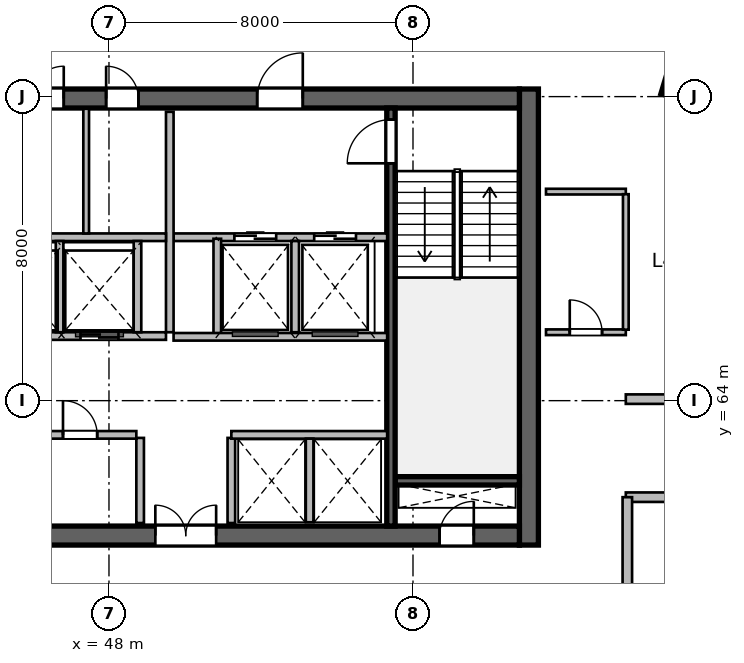
"""IFC4 building model, lengths in metres.
Left out: names, types, materials, properties, quantities, classifications, styles, units other than length and angle.
Written with IfcOpenShell. Run it as: python <this file> out.ifc"""

import sys

from ifc_helpers import new_model, si_unit, direction, frame, frame_2d, origin, origin_2d, place, context, subcontext, project, spatial, rectangle, extrude, source, transform, mapped, element, fill, save


model = new_model("IFC4")
c1 = context("Model", 3, precision=1e-05, world=origin(), true_north=direction((0.0, 1.0)))
c2 = subcontext(c1, "Body", "Model", "MODEL_VIEW")
j1 = project(units=[si_unit("LENGTHUNIT", "METRE"), si_unit("PLANEANGLEUNIT", "RADIAN")], contexts=[c1])
p1 = place(None, origin())
s1 = spatial("IfcSite", under=j1, at=p1, CompositionType="ELEMENT")
p2 = place(p1, origin())
s2 = spatial("IfcBuilding", under=s1, at=p2, CompositionType="ELEMENT")
p3 = place(p2, frame((0.0, 0.0, 177.9)))
s3 = spatial("IfcBuildingStorey", under=s2, at=p3, CompositionType="ELEMENT", Elevation=177.9)
m1 = source(origin(), c2, "Body", "SweptSolid", [
    extrude(rectangle(XDim=12.0, YDim=0.5, at=frame_2d((6.0, 0.0))), origin(), (0.0, 0.0, 1.0), 3.9),
])
p4 = place(p3, frame((59.05, 60.2, 0.0), z_axis=(0.0, 0.0, 1.0), x_axis=(0.0, 1.0, 0.0)))
e1 = element("IfcWall", 1, at=p4, inside=s3, PredefinedType="SHEAR", context=c2, shape_type="MappedRepresentation", body=[
    mapped(m1, transform((0.0, 0.0, 0.0), scale=1.0)),
])
m2 = source(origin(), c2, "Body", "SweptSolid", [
    extrude(rectangle(XDim=21.6, YDim=0.5, at=frame_2d((10.8, 0.0))), origin(), (0.0, 0.0, 1.0), 3.9),
])
p5 = place(p3, frame((37.2, 60.45, 0.0), z_axis=(0.0, 0.0, 1.0), x_axis=(1.0, 0.0, 0.0)))
e2 = element("IfcWall", 2, at=p5, inside=s3, PredefinedType="SHEAR", context=c2, shape_type="MappedRepresentation", body=[
    mapped(m2, transform((0.0, 0.0, 0.0), scale=1.0)),
])
p6 = place(p5, frame((1.1, 0.0, 0.0)))
e3 = element("IfcOpeningElement", 3, at=p6, cuts=e2, PredefinedType="OPENING", context=c2, shape_type="SweptSolid", body=[
    extrude(rectangle(XDim=1.15, YDim=2.15, at=frame_2d((0.575, 1.075))), frame((0.0, 0.26, 0.0), z_axis=(0.0, -1.0, 0.0), x_axis=(1.0, 0.0, 0.0)), (0.0, 0.0, 1.0), 0.52),
])
p7 = place(p5, frame((19.5, 0.0, 0.0)))
e4 = element("IfcOpeningElement", 4, at=p7, cuts=e2, PredefinedType="OPENING", context=c2, shape_type="SweptSolid", body=[
    extrude(rectangle(XDim=0.9, YDim=2.1, at=frame_2d((0.45, 1.05))), frame((0.0, 0.26, 0.0), z_axis=(0.0, -1.0, 0.0), x_axis=(1.0, 0.0, 0.0)), (0.0, 0.0, 1.0), 0.52),
])
p8 = place(p5, frame((12.02, 0.0, 0.0)))
e5 = element("IfcOpeningElement", 5, at=p8, cuts=e2, PredefinedType="OPENING", context=c2, shape_type="SweptSolid", body=[
    extrude(rectangle(XDim=1.6, YDim=2.15, at=frame_2d((0.8, 1.075))), frame((0.0, 0.26, 0.0), z_axis=(0.0, -1.0, 0.0), x_axis=(1.0, 0.0, 0.0)), (0.0, 0.0, 1.0), 0.52),
])
p9 = place(p3, frame((37.2, 71.95, 0.0), z_axis=(0.0, 0.0, 1.0), x_axis=(1.0, 0.0, 0.0)))
e6 = element("IfcWall", 6, at=p9, inside=s3, PredefinedType="SHEAR", context=c2, shape_type="MappedRepresentation", body=[
    mapped(m2, transform((0.0, 0.0, 0.0), scale=1.0)),
])
p10 = place(p9, frame((1.2, 0.0, 0.0)))
e7 = element("IfcOpeningElement", 7, at=p10, cuts=e6, PredefinedType="OPENING", context=c2, shape_type="SweptSolid", body=[
    extrude(rectangle(XDim=0.9, YDim=2.1, at=frame_2d((0.45, 1.05))), frame((0.0, 0.26, 0.0), z_axis=(0.0, -1.0, 0.0), x_axis=(1.0, 0.0, 0.0)), (0.0, 0.0, 1.0), 0.52),
])
p11 = place(p9, frame((14.7, 0.0, 0.0)))
e8 = element("IfcOpeningElement", 8, at=p11, cuts=e6, PredefinedType="OPENING", context=c2, shape_type="SweptSolid", body=[
    extrude(rectangle(XDim=1.2, YDim=2.15, at=frame_2d((0.6, 1.075))), frame((0.0, 0.26, 0.0), z_axis=(0.0, -1.0, 0.0), x_axis=(1.0, 0.0, 0.0)), (0.0, 0.0, 1.0), 0.52),
])
p12 = place(p9, frame((4.15, 0.0, 0.0)))
e9 = element("IfcOpeningElement", 9, at=p12, cuts=e6, PredefinedType="OPENING", context=c2, shape_type="SweptSolid", body=[
    extrude(rectangle(XDim=1.3, YDim=2.15, at=frame_2d((0.65, 1.075))), frame((0.0, 0.26, 0.0), z_axis=(0.0, -1.0, 0.0), x_axis=(1.0, 0.0, 0.0)), (0.0, 0.0, 1.0), 0.52),
])
p13 = place(p9, frame((6.76, 0.0, 0.0)))
e10 = element("IfcOpeningElement", 10, at=p13, cuts=e6, PredefinedType="OPENING", context=c2, shape_type="SweptSolid", body=[
    extrude(rectangle(XDim=0.85, YDim=2.1, at=frame_2d((0.425, 1.05))), frame((0.0, 0.26, 0.0), z_axis=(0.0, -1.0, 0.0), x_axis=(1.0, 0.0, 0.0)), (0.0, 0.0, 1.0), 0.52),
])
p14 = place(p9, frame((8.76, 0.0, 0.0)))
e11 = element("IfcOpeningElement", 11, at=p14, cuts=e6, PredefinedType="OPENING", context=c2, shape_type="SweptSolid", body=[
    extrude(rectangle(XDim=0.85, YDim=2.1, at=frame_2d((0.425, 1.05))), frame((0.0, 0.26, 0.0), z_axis=(0.0, -1.0, 0.0), x_axis=(1.0, 0.0, 0.0)), (0.0, 0.0, 1.0), 0.52),
])
p15 = place(p9, frame((10.725, 0.0, 0.0)))
e12 = element("IfcOpeningElement", 12, at=p15, cuts=e6, PredefinedType="OPENING", context=c2, shape_type="SweptSolid", body=[
    extrude(rectangle(XDim=0.85, YDim=2.1, at=frame_2d((0.425, 1.05))), frame((0.0, 0.26, 0.0), z_axis=(0.0, -1.0, 0.0), x_axis=(1.0, 0.0, 0.0)), (0.0, 0.0, 1.0), 0.52),
])
m3 = source(origin(), c2, "Body", "SweptSolid", [
    extrude(rectangle(XDim=3.27, YDim=0.22, at=frame_2d((1.635, 0.0))), origin(), (0.0, 0.0, 1.0), 3.9),
])
p16 = place(p3, frame((55.53, 61.89, 0.0), z_axis=(0.0, 0.0, 1.0), x_axis=(1.0, 0.0, 0.0)))
e13 = element("IfcWall", 13, at=p16, inside=s3, PredefinedType="SHEAR", context=c2, shape_type="MappedRepresentation", body=[
    mapped(m3, transform((0.0, 0.0, 0.0), scale=1.0)),
])
m4 = source(origin(), c2, "Body", "SweptSolid", [
    extrude(rectangle(XDim=11.0, YDim=0.22, at=frame_2d((5.5, 0.0))), origin(), (0.0, 0.0, 1.0), 3.9),
])
p17 = place(p3, frame((55.42, 60.7, 0.0), z_axis=(0.0, 0.0, 1.0), x_axis=(0.0, 1.0, 0.0)))
e14 = element("IfcWall", 14, at=p17, inside=s3, PredefinedType="SHEAR", context=c2, shape_type="MappedRepresentation", body=[
    mapped(m4, transform((0.0, 0.0, 0.0), scale=1.0)),
])
p18 = place(p17, frame((9.545, 0.0, 0.0)))
e15 = element("IfcOpeningElement", 15, at=p18, cuts=e14, PredefinedType="OPENING", context=c2, shape_type="SweptSolid", body=[
    extrude(rectangle(XDim=1.15, YDim=2.15, at=frame_2d((0.575, 1.075))), frame((0.0, 0.12, 0.0), z_axis=(0.0, -1.0, 0.0), x_axis=(1.0, 0.0, 0.0)), (0.0, 0.0, 1.0), 0.24),
])
m5 = source(origin(), c2, "Body", "SweptSolid", [
    extrude(rectangle(XDim=1.1, YDim=1.1, at=origin_2d()), origin(), (0.0, 0.0, 1.0), 3.9),
])
p19 = place(p3, frame((63.209, 72.442, 0.0), z_axis=(0.0, 0.0, 1.0), x_axis=(0.288697611798, 0.957420330337, 0.0)))
e16 = element("IfcColumn", 16, at=p19, inside=s3, PredefinedType="COLUMN", context=c2, shape_type="MappedRepresentation", body=[
    mapped(m5, transform((0.0, 0.0, 0.0), scale=1.0)),
])
m6 = source(origin(), c2, "Body", "SweptSolid", [
    extrude(rectangle(XDim=2.24, YDim=0.2, at=frame_2d((1.12, 0.0))), origin(), (0.0, 0.0, 1.0), 3.65),
])
for number, where, z_axis, x_axis in (
    (17, (48.82, 60.78, 0.0), (0.0, 0.0, 1.0), (0.0, 1.0, 0.0)),
    (18, (51.22, 60.78, 0.0), (0.0, 0.0, 1.0), (0.0, 1.0, 0.0)),
):
    element("IfcWall", number, at=place(p3, frame(where, z_axis=z_axis, x_axis=x_axis)), inside=s3, PredefinedType="SOLIDWALL", context=c2, shape_type="MappedRepresentation", body=[
        mapped(m6, transform((0.0, 0.0, 0.0), scale=1.0)),
    ])
m7 = source(origin(), c2, "Body", "SweptSolid", [
    extrude(rectangle(XDim=5.62, YDim=0.2, at=frame_2d((2.81, 0.0))), origin(), (0.0, 0.0, 1.0), 3.65),
])
p20 = place(p3, frame((49.7, 68.3, 0.0), z_axis=(0.0, 0.0, 1.0), x_axis=(1.0, 0.0, 0.0)))
e19 = element("IfcWall", 19, at=p20, inside=s3, PredefinedType="SOLIDWALL", context=c2, shape_type="MappedRepresentation", body=[
    mapped(m7, transform((0.0, 0.0, 0.0), scale=1.0)),
])
p21 = place(p20, frame((1.6, 0.0, 0.0)))
e20 = element("IfcOpeningElement", 20, at=p21, cuts=e19, PredefinedType="OPENING", context=c2, shape_type="SweptSolid", body=[
    extrude(rectangle(XDim=1.1, YDim=2.15, at=frame_2d((0.55, 1.075))), frame((0.0, 0.11, 0.0), z_axis=(0.0, -1.0, 0.0), x_axis=(1.0, 0.0, 0.0)), (0.0, 0.0, 1.0), 0.22),
])
p22 = place(p20, frame((3.7, 0.0, 0.0)))
e21 = element("IfcOpeningElement", 21, at=p22, cuts=e19, PredefinedType="OPENING", context=c2, shape_type="SweptSolid", body=[
    extrude(rectangle(XDim=1.1, YDim=2.15, at=frame_2d((0.55, 1.075))), frame((0.0, 0.11, 0.0), z_axis=(0.0, -1.0, 0.0), x_axis=(1.0, 0.0, 0.0)), (0.0, 0.0, 1.0), 0.22),
])
m8 = source(origin(), c2, "Body", "SweptSolid", [
    extrude(rectangle(XDim=5.8, YDim=0.2, at=frame_2d((2.9, 0.0))), origin(), (0.0, 0.0, 1.0), 3.65),
])
p23 = place(p3, frame((49.6, 65.8, 0.0), z_axis=(0.0, 0.0, 1.0), x_axis=(0.0, 1.0, 0.0)))
e22 = element("IfcWall", 22, at=p23, inside=s3, PredefinedType="SOLIDWALL", context=c2, shape_type="MappedRepresentation", body=[
    mapped(m8, transform((0.0, 0.0, 0.0), scale=1.0)),
])
m9 = source(origin(), c2, "Body", "SweptSolid", [
    extrude(rectangle(XDim=2.58, YDim=0.2, at=frame_2d((1.29, 0.0))), origin(), (0.0, 0.0, 1.0), 3.65),
])
p24 = place(p3, frame((50.85, 65.68, 0.0), z_axis=(0.0, 0.0, 1.0), x_axis=(0.0, 1.0, 0.0)))
e23 = element("IfcWall", 23, at=p24, inside=s3, PredefinedType="SOLIDWALL", context=c2, shape_type="MappedRepresentation", body=[
    mapped(m9, transform((0.0, 0.0, 0.0), scale=1.0)),
])
m10 = source(origin(), c2, "Body", "SweptSolid", [
    extrude(rectangle(XDim=2.4, YDim=0.2, at=frame_2d((1.2, 0.0))), origin(), (0.0, 0.0, 1.0), 3.65),
])
p25 = place(p3, frame((52.9, 65.8, 0.0), z_axis=(0.0, 0.0, 1.0), x_axis=(0.0, 1.0, 0.0)))
e24 = element("IfcWall", 24, at=p25, inside=s3, PredefinedType="SOLIDWALL", context=c2, shape_type="MappedRepresentation", body=[
    mapped(m10, transform((0.0, 0.0, 0.0), scale=1.0)),
])
p26 = place(p3, frame((49.7, 65.68, 0.0), z_axis=(0.0, 0.0, 1.0), x_axis=(1.0, 0.0, 0.0)))
e25 = element("IfcWall", 25, at=p26, inside=s3, PredefinedType="SOLIDWALL", context=c2, shape_type="MappedRepresentation", body=[
    mapped(m7, transform((0.0, 0.0, 0.0), scale=1.0)),
])
m11 = source(origin(), c2, "Body", "SweptSolid", [
    extrude(rectangle(XDim=8.8, YDim=0.2, at=frame_2d((4.4, 0.0))), origin(), (0.0, 0.0, 1.0), 3.65),
])
p27 = place(p3, frame((40.7, 68.3, 0.0), z_axis=(0.0, 0.0, 1.0), x_axis=(1.0, 0.0, 0.0)))
e26 = element("IfcWall", 26, at=p27, inside=s3, PredefinedType="SOLIDWALL", context=c2, shape_type="MappedRepresentation", body=[
    mapped(m11, transform((0.0, 0.0, 0.0), scale=1.0)),
])
m12 = source(origin(), c2, "Body", "SweptSolid", [
    extrude(rectangle(XDim=3.28, YDim=0.15, at=frame_2d((1.64, 0.0))), origin(), (0.0, 0.0, 1.0), 3.65),
])
p28 = place(p3, frame((47.4, 68.4, 0.0), z_axis=(0.0, 0.0, 1.0), x_axis=(0.0, 1.0, 0.0)))
e27 = element("IfcWall", 27, at=p28, inside=s3, PredefinedType="PARTITIONING", context=c2, shape_type="MappedRepresentation", body=[
    mapped(m12, transform((0.0, 0.0, 0.0), scale=1.0)),
])
m13 = source(origin(), c2, "Body", "SweptSolid", [
    extrude(rectangle(XDim=8.02, YDim=0.2, at=frame_2d((4.01, 0.0))), origin(), (0.0, 0.0, 1.0), 3.65),
])
p29 = place(p3, frame((40.7, 63.1, 0.0), z_axis=(0.0, 0.0, 1.0), x_axis=(1.0, 0.0, 0.0)))
e28 = element("IfcWall", 28, at=p29, inside=s3, PredefinedType="SOLIDWALL", context=c2, shape_type="MappedRepresentation", body=[
    mapped(m13, transform((0.0, 0.0, 0.0), scale=1.0)),
])
p30 = place(p29, frame((2.15, 0.0, 0.0)))
e29 = element("IfcOpeningElement", 29, at=p30, cuts=e28, PredefinedType="OPENING", context=c2, shape_type="SweptSolid", body=[
    extrude(rectangle(XDim=0.9, YDim=2.1, at=frame_2d((0.45, 1.05))), frame((0.0, 0.11, 0.0), z_axis=(0.0, -1.0, 0.0), x_axis=(1.0, 0.0, 0.0)), (0.0, 0.0, 1.0), 0.22),
])
p31 = place(p29, frame((6.09, 0.0, 0.0)))
e30 = element("IfcOpeningElement", 30, at=p31, cuts=e28, PredefinedType="OPENING", context=c2, shape_type="SweptSolid", body=[
    extrude(rectangle(XDim=0.9, YDim=2.1, at=frame_2d((0.45, 1.05))), frame((0.0, 0.11, 0.0), z_axis=(0.0, -1.0, 0.0), x_axis=(1.0, 0.0, 0.0)), (0.0, 0.0, 1.0), 0.22),
])
m14 = source(origin(), c2, "Body", "SweptSolid", [
    extrude(rectangle(XDim=4.1, YDim=0.2, at=frame_2d((2.05, 0.0))), origin(), (0.0, 0.0, 1.0), 3.65),
])
p32 = place(p3, frame((51.22, 63.1, 0.0), z_axis=(0.0, 0.0, 1.0), x_axis=(1.0, 0.0, 0.0)))
e31 = element("IfcWall", 31, at=p32, inside=s3, PredefinedType="SOLIDWALL", context=c2, shape_type="MappedRepresentation", body=[
    mapped(m14, transform((0.0, 0.0, 0.0), scale=1.0)),
])
m15 = source(origin(), c2, "Body", "SweptSolid", [
    extrude(rectangle(XDim=2.2, YDim=0.2, at=frame_2d((1.1, 0.0))), origin(), (0.0, 0.0, 1.0), 3.65),
])
p33 = place(p3, frame((53.28, 60.8, 0.0), z_axis=(0.0, 0.0, 1.0), x_axis=(0.0, 1.0, 0.0)))
e32 = element("IfcWall", 32, at=p33, inside=s3, PredefinedType="SOLIDWALL", context=c2, shape_type="MappedRepresentation", body=[
    mapped(m15, transform((0.0, 0.0, 0.0), scale=1.0)),
])
p34 = place(p3, frame((40.7, 65.7, 0.0), z_axis=(0.0, 0.0, 1.0), x_axis=(1.0, 0.0, 0.0)))
e33 = element("IfcWall", 33, at=p34, inside=s3, PredefinedType="SOLIDWALL", context=c2, shape_type="MappedRepresentation", body=[
    mapped(m11, transform((0.0, 0.0, 0.0), scale=1.0)),
])
p35 = place(p34, frame((0.72, 0.0, 0.0)))
e34 = element("IfcOpeningElement", 34, at=p35, cuts=e33, PredefinedType="OPENING", context=c2, shape_type="SweptSolid", body=[
    extrude(rectangle(XDim=1.0, YDim=2.15, at=frame_2d((0.5, 1.075))), frame((0.0, 0.11, 0.0), z_axis=(0.0, -1.0, 0.0), x_axis=(1.0, 0.0, 0.0)), (0.0, 0.0, 1.0), 0.22),
])
p36 = place(p34, frame((2.62, 0.0, 0.0)))
e35 = element("IfcOpeningElement", 35, at=p36, cuts=e33, PredefinedType="OPENING", context=c2, shape_type="SweptSolid", body=[
    extrude(rectangle(XDim=1.0, YDim=2.15, at=frame_2d((0.5, 1.075))), frame((0.0, 0.11, 0.0), z_axis=(0.0, -1.0, 0.0), x_axis=(1.0, 0.0, 0.0)), (0.0, 0.0, 1.0), 0.22),
])
p37 = place(p34, frame((4.55, 0.0, 0.0)))
e36 = element("IfcOpeningElement", 36, at=p37, cuts=e33, PredefinedType="OPENING", context=c2, shape_type="SweptSolid", body=[
    extrude(rectangle(XDim=1.0, YDim=2.15, at=frame_2d((0.5, 1.075))), frame((0.0, 0.11, 0.0), z_axis=(0.0, -1.0, 0.0), x_axis=(1.0, 0.0, 0.0)), (0.0, 0.0, 1.0), 0.22),
])
p38 = place(p34, frame((6.55, 0.0, 0.0)))
e37 = element("IfcOpeningElement", 37, at=p38, cuts=e33, PredefinedType="OPENING", context=c2, shape_type="SweptSolid", body=[
    extrude(rectangle(XDim=1.0, YDim=2.15, at=frame_2d((0.5, 1.075))), frame((0.0, 0.11, 0.0), z_axis=(0.0, -1.0, 0.0), x_axis=(1.0, 0.0, 0.0)), (0.0, 0.0, 1.0), 0.22),
])
for number, where, z_axis, x_axis in (
    (38, (48.75, 65.8, 0.0), (0.0, 0.0, 1.0), (0.0, 1.0, 0.0)),
    (39, (46.7, 65.8, 0.0), (0.0, 0.0, 1.0), (0.0, 1.0, 0.0)),
):
    element("IfcWall", number, at=place(p3, frame(where, z_axis=z_axis, x_axis=x_axis)), inside=s3, PredefinedType="SOLIDWALL", context=c2, shape_type="MappedRepresentation", body=[
        mapped(m10, transform((0.0, 0.0, 0.0), scale=1.0)),
    ])
m16 = source(origin(), c2, "Body", "SweptSolid", [
    extrude(rectangle(XDim=2.1, YDim=0.15, at=frame_2d((1.05, 0.0))), origin(), (0.0, 0.0, 1.0), 3.65),
])
p39 = place(p3, frame((59.5, 65.8, 0.0), z_axis=(0.0, 0.0, 1.0), x_axis=(1.0, 0.0, 0.0)))
e40 = element("IfcWall", 40, at=p39, inside=s3, PredefinedType="PARTITIONING", context=c2, shape_type="MappedRepresentation", body=[
    mapped(m16, transform((0.0, 0.0, 0.0), scale=1.0)),
])
p40 = place(p39, frame((0.625, 0.0, 0.0)))
e41 = element("IfcOpeningElement", 41, at=p40, cuts=e40, PredefinedType="OPENING", context=c2, shape_type="SweptSolid", body=[
    extrude(rectangle(XDim=0.85, YDim=2.1, at=frame_2d((0.425, 1.05))), frame((0.0, 0.085, 0.0), z_axis=(0.0, -1.0, 0.0), x_axis=(1.0, 0.0, 0.0)), (0.0, 0.0, 1.0), 0.17),
])
p41 = place(p3, frame((59.5, 69.5, 0.0), z_axis=(0.0, 0.0, 1.0), x_axis=(1.0, 0.0, 0.0)))
e42 = element("IfcWall", 42, at=p41, inside=s3, PredefinedType="PARTITIONING", context=c2, shape_type="MappedRepresentation", body=[
    mapped(m16, transform((0.0, 0.0, 0.0), scale=1.0)),
])
m17 = source(origin(), c2, "Body", "SweptSolid", [
    extrude(rectangle(XDim=3.565, YDim=0.15, at=frame_2d((1.783, 0.0))), origin(), (0.0, 0.0, 1.0), 3.65),
])
p42 = place(p3, frame((61.6, 65.867, 0.0), z_axis=(0.0, 0.0, 1.0), x_axis=(0.0, 1.0, 0.0)))
e43 = element("IfcWall", 43, at=p42, inside=s3, PredefinedType="PARTITIONING", context=c2, shape_type="MappedRepresentation", body=[
    mapped(m17, transform((0.0, 0.0, 0.0), scale=1.0)),
])
m18 = source(origin(), c2, "Body", "SweptSolid", [
    extrude(rectangle(XDim=3.9, YDim=0.25, at=frame_2d((1.95, 0.0))), origin(), (0.0, 0.0, 1.0), 3.65),
])
p43 = place(p3, frame((61.6, 64.04, 0.0), z_axis=(0.0, 0.0, 1.0), x_axis=(1.0, 0.0, 0.0)))
e44 = element("IfcWall", 44, at=p43, inside=s3, PredefinedType="PARTITIONING", context=c2, shape_type="MappedRepresentation", body=[
    mapped(m18, transform((0.0, 0.0, 0.0), scale=1.0)),
])
p44 = place(p43, frame((1.475, 0.0, 0.0)))
e45 = element("IfcOpeningElement", 45, at=p44, cuts=e44, PredefinedType="OPENING", context=c2, shape_type="SweptSolid", body=[
    extrude(rectangle(XDim=0.95, YDim=2.1, at=frame_2d((0.475, 1.05))), frame((0.0, 0.135, 0.0), z_axis=(0.0, -1.0, 0.0), x_axis=(1.0, 0.0, 0.0)), (0.0, 0.0, 1.0), 0.27),
])
p45 = place(p3, frame((61.6, 61.46, 0.0), z_axis=(0.0, 0.0, 1.0), x_axis=(1.0, 0.0, 0.0)))
e46 = element("IfcWall", 46, at=p45, inside=s3, PredefinedType="PARTITIONING", context=c2, shape_type="MappedRepresentation", body=[
    mapped(m18, transform((0.0, 0.0, 0.0), scale=1.0)),
])
p46 = place(p45, frame((1.475, 0.0, 0.0)))
e47 = element("IfcOpeningElement", 47, at=p46, cuts=e46, PredefinedType="OPENING", context=c2, shape_type="SweptSolid", body=[
    extrude(rectangle(XDim=0.95, YDim=2.1, at=frame_2d((0.475, 1.05))), frame((0.0, 0.135, 0.0), z_axis=(0.0, -1.0, 0.0), x_axis=(1.0, 0.0, 0.0)), (0.0, 0.0, 1.0), 0.27),
])
m19 = source(origin(), c2, "Body", "SweptSolid", [
    extrude(rectangle(XDim=12.126, YDim=0.25, at=frame_2d((6.063, 0.0))), origin(), (0.0, 0.0, 1.0), 2.942),
])
p47 = place(p3, frame((61.64, 49.334, 0.0), z_axis=(0.0, 0.0, 1.0), x_axis=(0.0, 1.0, 0.0)))
e48 = element("IfcWall", 48, at=p47, inside=s3, PredefinedType="PARTITIONING", context=c2, shape_type="MappedRepresentation", body=[
    mapped(m19, transform((0.0, 0.0, 0.0), scale=1.0)),
])
m20 = source(origin(), c2, "Body", "SweptSolid", [
    extrude(rectangle(XDim=0.9, YDim=2.1, at=frame_2d((0.45, 1.05))), frame((0.0, 0.025, 0.0), z_axis=(0.0, -1.0, 0.0), x_axis=(1.0, 0.0, 0.0)), (0.0, 0.0, 1.0), 0.05),
])
p48 = place(p7, origin())
e49 = element("IfcDoor", 49, at=p48, inside=s3, OperationType="SINGLE_SWING_RIGHT", PredefinedType="DOOR", context=c2, shape_type="MappedRepresentation", body=[
    mapped(m20, transform((0.0, 0.0, 0.0), scale=1.0)),
])
fill(e4, e49)
m21 = source(origin(), c2, "Body", "SweptSolid", [
    extrude(rectangle(XDim=1.15, YDim=2.15, at=frame_2d((0.575, 1.075))), frame((0.0, 0.025, 0.0), z_axis=(0.0, -1.0, 0.0), x_axis=(1.0, 0.0, 0.0)), (0.0, 0.0, 1.0), 0.05),
])
p49 = place(p18, origin())
e50 = element("IfcDoor", 50, at=p49, inside=s3, OperationType="SINGLE_SWING_LEFT", PredefinedType="DOOR", context=c2, shape_type="MappedRepresentation", body=[
    mapped(m21, transform((0.0, 0.0, 0.0), scale=1.0)),
])
fill(e15, e50)
m22 = source(origin(), c2, "Body", "SweptSolid", [
    extrude(rectangle(XDim=1.6, YDim=2.15, at=frame_2d((0.8, 1.075))), frame((0.0, 0.025, 0.0), z_axis=(0.0, -1.0, 0.0), x_axis=(1.0, 0.0, 0.0)), (0.0, 0.0, 1.0), 0.05),
])
p50 = place(p8, origin())
e51 = element("IfcDoor", 51, at=p50, inside=s3, OperationType="DOUBLE_DOOR_SINGLE_SWING", PredefinedType="DOOR", context=c2, shape_type="MappedRepresentation", body=[
    mapped(m22, transform((0.0, 0.0, 0.0), scale=1.0)),
])
fill(e5, e51)
m23 = source(origin(), c2, "Body", "SweptSolid", [
    extrude(rectangle(XDim=1.2, YDim=2.15, at=frame_2d((0.6, 1.075))), frame((0.0, 0.025, 0.0), z_axis=(0.0, -1.0, 0.0), x_axis=(1.0, 0.0, 0.0)), (0.0, 0.0, 1.0), 0.05),
])
p51 = place(p11, origin())
e52 = element("IfcDoor", 52, at=p51, inside=s3, OperationType="SINGLE_SWING_RIGHT", PredefinedType="DOOR", context=c2, shape_type="MappedRepresentation", body=[
    mapped(m23, transform((0.0, 0.0, 0.0), scale=1.0)),
])
fill(e8, e52)
m24 = source(origin(), c2, "Body", "SweptSolid", [
    extrude(rectangle(XDim=1.1, YDim=2.15, at=frame_2d((0.55, 1.075))), frame((0.0, 0.025, 0.0), z_axis=(0.0, -1.0, 0.0), x_axis=(1.0, 0.0, 0.0)), (0.0, 0.0, 1.0), 0.05),
])
p52 = place(p21, origin())
e53 = element("IfcDoor", 53, at=p52, inside=s3, OperationType="DOUBLE_DOOR_SLIDING", PredefinedType="DOOR", context=c2, shape_type="MappedRepresentation", body=[
    mapped(m24, transform((0.0, 0.0, 0.0), scale=1.0)),
])
fill(e20, e53)
p53 = place(p22, origin())
e54 = element("IfcDoor", 54, at=p53, inside=s3, OperationType="DOUBLE_DOOR_SLIDING", PredefinedType="DOOR", context=c2, shape_type="MappedRepresentation", body=[
    mapped(m24, transform((0.0, 0.0, 0.0), scale=1.0)),
])
fill(e21, e54)
m25 = source(origin(), c2, "Body", "SweptSolid", [
    extrude(rectangle(XDim=0.85, YDim=2.1, at=frame_2d((0.425, 1.05))), frame((0.0, 0.025, 0.0), z_axis=(0.0, -1.0, 0.0), x_axis=(1.0, 0.0, 0.0)), (0.0, 0.0, 1.0), 0.05),
])
p54 = place(p14, origin())
e55 = element("IfcDoor", 55, at=p54, inside=s3, OperationType="SINGLE_SWING_RIGHT", PredefinedType="DOOR", context=c2, shape_type="MappedRepresentation", body=[
    mapped(m25, transform((0.0, 0.0, 0.0), scale=1.0)),
])
fill(e11, e55)
p55 = place(p15, origin())
e56 = element("IfcDoor", 56, at=p55, inside=s3, OperationType="SINGLE_SWING_LEFT", PredefinedType="DOOR", context=c2, shape_type="MappedRepresentation", body=[
    mapped(m25, transform((0.0, 0.0, 0.0), scale=1.0)),
])
fill(e12, e56)
p56 = place(p31, origin())
e57 = element("IfcDoor", 57, at=p56, inside=s3, OperationType="SINGLE_SWING_LEFT", PredefinedType="DOOR", context=c2, shape_type="MappedRepresentation", body=[
    mapped(m20, transform((0.0, 0.0, 0.0), scale=1.0)),
])
fill(e30, e57)
m26 = source(origin(), c2, "Body", "SweptSolid", [
    extrude(rectangle(XDim=1.0, YDim=2.15, at=frame_2d((0.5, 1.075))), frame((0.0, 0.025, 0.0), z_axis=(0.0, -1.0, 0.0), x_axis=(1.0, 0.0, 0.0)), (0.0, 0.0, 1.0), 0.05),
])
p57 = place(p38, origin())
e58 = element("IfcDoor", 58, at=p57, inside=s3, OperationType="DOUBLE_DOOR_SLIDING", PredefinedType="DOOR", context=c2, shape_type="MappedRepresentation", body=[
    mapped(m26, transform((0.0, 0.0, 0.0), scale=1.0)),
])
fill(e37, e58)
p58 = place(p40, origin())
e59 = element("IfcDoor", 59, at=p58, inside=s3, OperationType="SINGLE_SWING_LEFT", PredefinedType="DOOR", context=c2, shape_type="MappedRepresentation", body=[
    mapped(m25, transform((0.0, 0.0, 0.0), scale=1.0)),
])
fill(e41, e59)
save(model, sys.argv[1])
